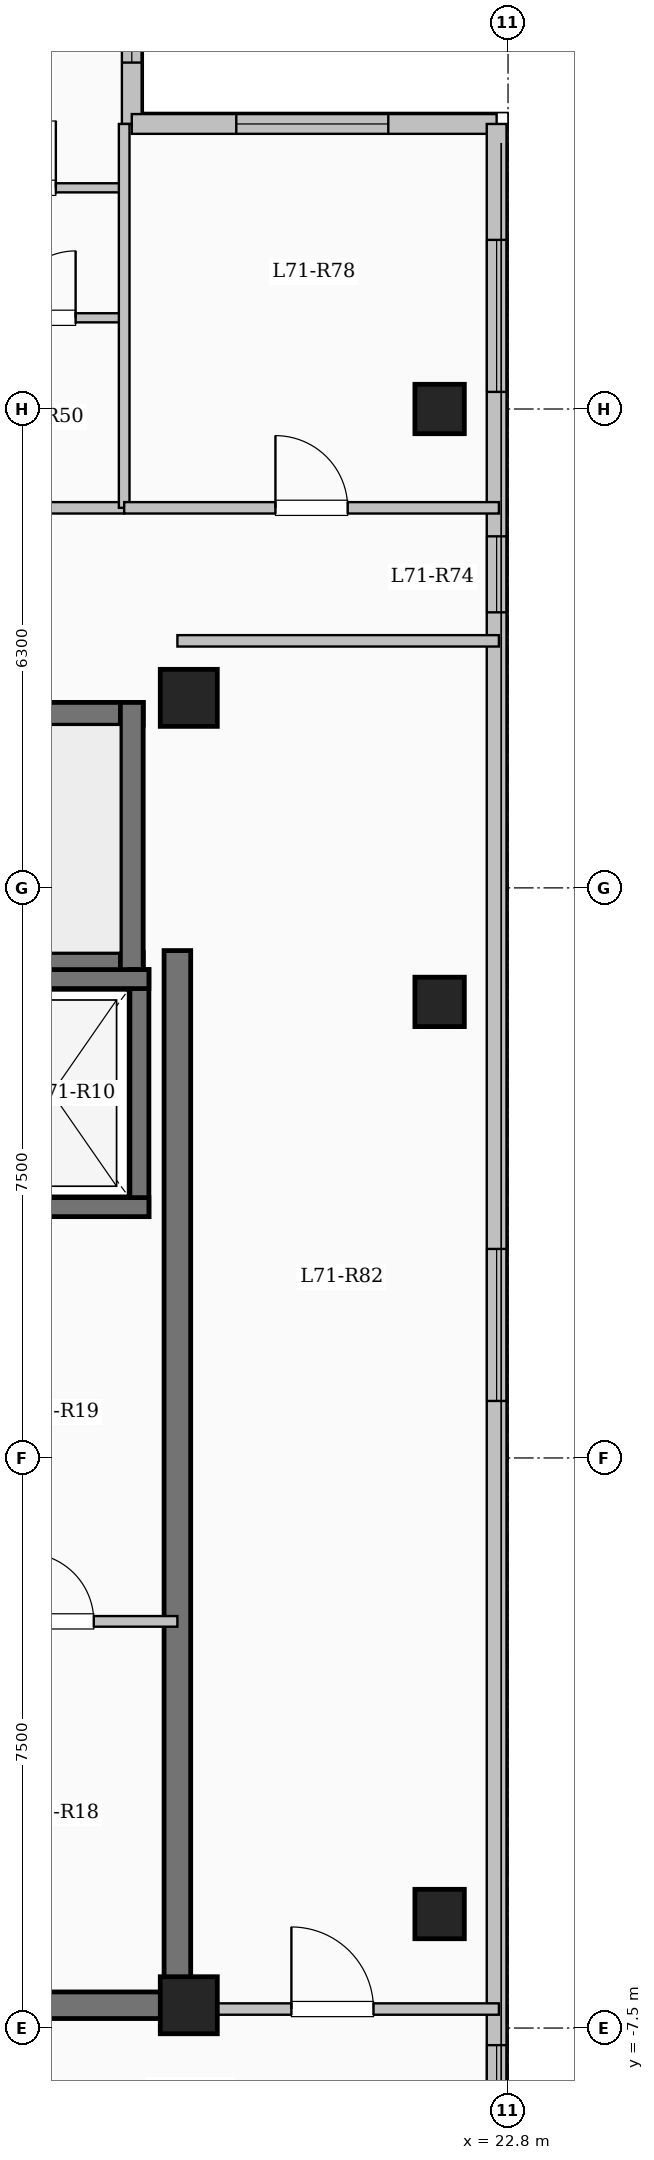
"""IFC4 building model, lengths in metres.
Left out: names, types, materials, properties, quantities, classifications, styles, units other than length and angle.
Written with IfcOpenShell. Run it as: python <this file> out.ifc"""

import sys

from ifc_helpers import new_model, si_unit, direction, frame, frame_2d, origin, origin_2d, place, context, subcontext, project, spatial, rectangle, extrude, element, fill, save


model = new_model("IFC4")
c1 = context("Model", 3, precision=1e-05, world=origin(), true_north=direction((0.0, 1.0)))
c2 = subcontext(c1, "Body", "Model", "MODEL_VIEW")
j1 = project(units=[si_unit("LENGTHUNIT", "METRE"), si_unit("PLANEANGLEUNIT", "RADIAN")], contexts=[c1])
p1 = place(None, origin())
s1 = spatial("IfcSite", under=j1, at=p1, CompositionType="ELEMENT")
p2 = place(p1, origin())
s2 = spatial("IfcBuilding", under=s1, at=p2, CompositionType="ELEMENT")
p3 = place(p2, frame((0.0, 0.0, 261.6)))
s3 = spatial("IfcBuildingStorey", under=s2, at=p3, CompositionType="ELEMENT", Elevation=261.6)
for number, where, z_axis, x_axis in (
    (1, (18.6, -7.2, 0.0), (0.0, 0.0, 1.0), (1.0, 0.0, 0.0)),
    (2, (18.6, 10.0, 0.0), (0.0, 0.0, 1.0), (1.0, 0.0, 0.0)),
):
    element("IfcColumn", number, at=place(p3, frame(where, z_axis=z_axis, x_axis=x_axis)), inside=s3, PredefinedType="COLUMN", context=c2, shape_type="SweptSolid", body=[
        extrude(rectangle(XDim=0.75, YDim=0.75, at=origin_2d()), origin(), (0.0, 0.0, 1.0), 3.35),
    ])
for number, where, z_axis, x_axis in (
    (3, (21.9, -6.0, 0.0), (0.0, 0.0, 1.0), (1.0, 0.0, 0.0)),
    (4, (21.9, 6.0, 0.0), (0.0, 0.0, 1.0), (1.0, 0.0, 0.0)),
    (5, (21.9, 13.8, 0.0), (0.0, 0.0, 1.0), (1.0, 0.0, 0.0)),
):
    element("IfcColumn", number, at=place(p3, frame(where, z_axis=z_axis, x_axis=x_axis)), inside=s3, PredefinedType="COLUMN", context=c2, shape_type="SweptSolid", body=[
        extrude(rectangle(XDim=0.65, YDim=0.65, at=origin_2d()), origin(), (0.0, 0.0, 1.0), 3.35),
    ])
p4 = place(p3, frame((17.85, 20.85, 0.0), z_axis=(0.0, 0.0, 1.0), x_axis=(0.0, -1.0, 0.0)))
e6 = element("IfcWall", 6, at=p4, inside=s3, PredefinedType="SOLIDWALL", context=c2, shape_type="SweptSolid", body=[
    extrude(rectangle(XDim=3.3, YDim=0.26, at=frame_2d((1.65, 0.0))), origin(), (0.0, 0.0, 1.0), 3.1),
])
p5 = place(p4, frame((0.843, 0.0, 0.9)))
e7 = element("IfcOpeningElement", 7, at=p5, cuts=e6, PredefinedType="OPENING", context=c2, shape_type="SweptSolid", body=[
    extrude(rectangle(XDim=1.65, YDim=1.6, at=frame_2d((0.825, 0.8))), frame((0.0, 0.14, 0.0), z_axis=(0.0, -1.0, 0.0), x_axis=(1.0, 0.0, 0.0)), (0.0, 0.0, 1.0), 0.28),
])
p6 = place(p3, frame((17.85, 17.55, 0.0), z_axis=(0.0, 0.0, 1.0), x_axis=(1.0, 0.0, 0.0)))
e8 = element("IfcWall", 8, at=p6, inside=s3, PredefinedType="SOLIDWALL", context=c2, shape_type="SweptSolid", body=[
    extrude(rectangle(XDim=4.8, YDim=0.26, at=frame_2d((2.4, 0.0))), origin(), (0.0, 0.0, 1.0), 3.1),
])
p7 = place(p6, frame((1.375, 0.0, 0.9)))
e9 = element("IfcOpeningElement", 9, at=p7, cuts=e8, PredefinedType="OPENING", context=c2, shape_type="SweptSolid", body=[
    extrude(rectangle(XDim=2.0, YDim=1.7, at=frame_2d((1.0, 0.85))), frame((0.0, 0.14, 0.0), z_axis=(0.0, -1.0, 0.0), x_axis=(1.0, 0.0, 0.0)), (0.0, 0.0, 1.0), 0.28),
])
p8 = place(p3, frame((22.65, 17.55, 0.0), z_axis=(0.0, 0.0, 1.0), x_axis=(0.0, -1.0, 0.0)))
e10 = element("IfcWall", 10, at=p8, inside=s3, PredefinedType="SOLIDWALL", context=c2, shape_type="SweptSolid", body=[
    extrude(rectangle(XDim=35.1, YDim=0.26, at=frame_2d((17.55, 0.0))), origin(), (0.0, 0.0, 1.0), 3.1),
])
p9 = place(p8, frame((1.525, 0.0, 0.9)))
e11 = element("IfcOpeningElement", 11, at=p9, cuts=e10, PredefinedType="OPENING", context=c2, shape_type="SweptSolid", body=[
    extrude(rectangle(XDim=2.0, YDim=1.7, at=frame_2d((1.0, 0.85))), frame((0.0, 0.14, 0.0), z_axis=(0.0, -1.0, 0.0), x_axis=(1.0, 0.0, 0.0)), (0.0, 0.0, 1.0), 0.28),
])
p10 = place(p8, frame((5.425, 0.0, 0.95)))
e12 = element("IfcOpeningElement", 12, at=p10, cuts=e10, PredefinedType="OPENING", context=c2, shape_type="SweptSolid", body=[
    extrude(rectangle(XDim=1.0, YDim=1.5, at=frame_2d((0.5, 0.75))), frame((0.0, 0.14, 0.0), z_axis=(0.0, -1.0, 0.0), x_axis=(1.0, 0.0, 0.0)), (0.0, 0.0, 1.0), 0.28),
])
p11 = place(p8, frame((14.8, 0.0, 0.9)))
e13 = element("IfcOpeningElement", 13, at=p11, cuts=e10, PredefinedType="OPENING", context=c2, shape_type="SweptSolid", body=[
    extrude(rectangle(XDim=2.0, YDim=1.7, at=frame_2d((1.0, 0.85))), frame((0.0, 0.14, 0.0), z_axis=(0.0, -1.0, 0.0), x_axis=(1.0, 0.0, 0.0)), (0.0, 0.0, 1.0), 0.28),
])
p12 = place(p8, frame((25.275, 0.0, 0.95)))
e14 = element("IfcOpeningElement", 14, at=p12, cuts=e10, PredefinedType="OPENING", context=c2, shape_type="SweptSolid", body=[
    extrude(rectangle(XDim=1.2, YDim=1.5, at=frame_2d((0.6, 0.75))), frame((0.0, 0.14, 0.0), z_axis=(0.0, -1.0, 0.0), x_axis=(1.0, 0.0, 0.0)), (0.0, 0.0, 1.0), 0.28),
])
p13 = place(p8, frame((29.925, 0.0, 0.9)))
e15 = element("IfcOpeningElement", 15, at=p13, cuts=e10, PredefinedType="OPENING", context=c2, shape_type="SweptSolid", body=[
    extrude(rectangle(XDim=2.2, YDim=1.75, at=frame_2d((1.1, 0.875))), frame((0.0, 0.14, 0.0), z_axis=(0.0, -1.0, 0.0), x_axis=(1.0, 0.0, 0.0)), (0.0, 0.0, 1.0), 0.28),
])
p14 = place(p3, frame((10.0, 9.79, 0.0), z_axis=(0.0, 0.0, 1.0), x_axis=(1.0, 0.0, 0.0)))
e16 = element("IfcWall", 16, at=p14, inside=s3, PredefinedType="SHEAR", context=c2, shape_type="SweptSolid", body=[
    extrude(rectangle(XDim=8.0, YDim=0.3, at=frame_2d((4.0, 0.0))), origin(), (0.0, 0.0, 1.0), 3.35),
])
p15 = place(p3, frame((10.0, 6.5, 0.0), z_axis=(0.0, 0.0, 1.0), x_axis=(1.0, 0.0, 0.0)))
e17 = element("IfcWall", 17, at=p15, inside=s3, PredefinedType="SHEAR", context=c2, shape_type="SweptSolid", body=[
    extrude(rectangle(XDim=8.0, YDim=0.3, at=frame_2d((4.0, 0.0))), origin(), (0.0, 0.0, 1.0), 3.35),
])
p16 = place(p15, frame((0.55, 0.0, 0.0)))
e18 = element("IfcOpeningElement", 18, at=p16, cuts=e17, PredefinedType="OPENING", context=c2, shape_type="SweptSolid", body=[
    extrude(rectangle(XDim=1.0, YDim=2.15, at=frame_2d((0.5, 1.075))), frame((0.0, 0.16, 0.0), z_axis=(0.0, -1.0, 0.0), x_axis=(1.0, 0.0, 0.0)), (0.0, 0.0, 1.0), 0.32),
])
p17 = place(p3, frame((17.85, 6.35, 0.0), z_axis=(0.0, 0.0, 1.0), x_axis=(0.0, 1.0, 0.0)))
e19 = element("IfcWall", 19, at=p17, inside=s3, PredefinedType="SHEAR", context=c2, shape_type="SweptSolid", body=[
    extrude(rectangle(XDim=3.59, YDim=0.3, at=frame_2d((1.795, 0.0))), origin(), (0.0, 0.0, 1.0), 3.35),
])
p18 = place(p3, frame((17.95, 3.175, 0.0), z_axis=(0.0, 0.0, 1.0), x_axis=(0.0, 1.0, 0.0)))
e20 = element("IfcWall", 20, at=p18, inside=s3, PredefinedType="SHEAR", context=c2, shape_type="SweptSolid", body=[
    extrude(rectangle(XDim=3.25, YDim=0.25, at=frame_2d((1.625, 0.0))), origin(), (0.0, 0.0, 1.0), 3.35),
])
for number, where, z_axis, x_axis in (
    (21, (15.525, 3.3, 0.0), (0.0, 0.0, 1.0), (1.0, 0.0, 0.0)),
    (22, (15.525, 6.3, 0.0), (0.0, 0.0, 1.0), (1.0, 0.0, 0.0)),
):
    element("IfcWall", number, at=place(p3, frame(where, z_axis=z_axis, x_axis=x_axis)), inside=s3, PredefinedType="SHEAR", context=c2, shape_type="SweptSolid", body=[
        extrude(rectangle(XDim=2.55, YDim=0.25, at=frame_2d((1.275, 0.0))), origin(), (0.0, 0.0, 1.0), 3.35),
    ])
p19 = place(p3, frame((18.45, -7.375, 0.0), z_axis=(0.0, 0.0, 1.0), x_axis=(0.0, 1.0, 0.0)))
e23 = element("IfcWall", 23, at=p19, inside=s3, PredefinedType="SHEAR", context=c2, shape_type="SweptSolid", body=[
    extrude(rectangle(XDim=14.05, YDim=0.35, at=frame_2d((7.025, 0.0))), origin(), (0.0, 0.0, 1.0), 3.35),
])
p20 = place(p3, frame((12.625, -7.2, 0.0), z_axis=(0.0, 0.0, 1.0), x_axis=(1.0, 0.0, 0.0)))
e24 = element("IfcWall", 24, at=p20, inside=s3, PredefinedType="SHEAR", context=c2, shape_type="SweptSolid", body=[
    extrude(rectangle(XDim=6.0, YDim=0.35, at=frame_2d((3.0, 0.0))), origin(), (0.0, 0.0, 1.0), 3.35),
])
p21 = place(p3, frame((15.4, -2.15, 0.0), z_axis=(0.0, 0.0, 1.0), x_axis=(1.0, 0.0, 0.0)))
e25 = element("IfcWall", 25, at=p21, inside=s3, PredefinedType="PARTITIONING", context=c2, shape_type="SweptSolid", body=[
    extrude(rectangle(XDim=3.05, YDim=0.14, at=frame_2d((1.525, 0.0))), origin(), (0.0, 0.0, 1.0), 3.1),
])
p22 = place(p21, frame((1.05, 0.0, 0.0)))
e26 = element("IfcOpeningElement", 26, at=p22, cuts=e25, PredefinedType="OPENING", context=c2, shape_type="SweptSolid", body=[
    extrude(rectangle(XDim=0.9, YDim=2.08, at=frame_2d((0.45, 1.04))), frame((0.0, 0.08, 0.0), z_axis=(0.0, -1.0, 0.0), x_axis=(1.0, 0.0, 0.0)), (0.0, 0.0, 1.0), 0.16),
])
p23 = place(p3, frame((3.85, 12.5, 0.0), z_axis=(0.0, 0.0, 1.0), x_axis=(1.0, 0.0, 0.0)))
e27 = element("IfcWall", 27, at=p23, inside=s3, PredefinedType="PARTITIONING", context=c2, shape_type="SweptSolid", body=[
    extrude(rectangle(XDim=13.9, YDim=0.15, at=frame_2d((6.95, 0.0))), origin(), (0.0, 0.0, 1.0), 3.1),
])
p24 = place(p23, frame((0.7, 0.0, 0.0)))
e28 = element("IfcOpeningElement", 28, at=p24, cuts=e27, PredefinedType="OPENING", context=c2, shape_type="SweptSolid", body=[
    extrude(rectangle(XDim=0.96, YDim=2.15, at=frame_2d((0.48, 1.075))), frame((0.0, 0.085, 0.0), z_axis=(0.0, -1.0, 0.0), x_axis=(1.0, 0.0, 0.0)), (0.0, 0.0, 1.0), 0.17),
])
p25 = place(p23, frame((6.35, 0.0, 0.0)))
e29 = element("IfcOpeningElement", 29, at=p25, cuts=e27, PredefinedType="OPENING", context=c2, shape_type="SweptSolid", body=[
    extrude(rectangle(XDim=0.96, YDim=2.15, at=frame_2d((0.48, 1.075))), frame((0.0, 0.085, 0.0), z_axis=(0.0, -1.0, 0.0), x_axis=(1.0, 0.0, 0.0)), (0.0, 0.0, 1.0), 0.17),
])
p26 = place(p3, frame((15.592, 15.0, 0.0), z_axis=(0.0, 0.0, 1.0), x_axis=(1.0, 0.0, 0.0)))
e30 = element("IfcWall", 30, at=p26, inside=s3, PredefinedType="PARTITIONING", context=c2, shape_type="SweptSolid", body=[
    extrude(rectangle(XDim=2.158, YDim=0.12, at=frame_2d((1.079, 0.0))), origin(), (0.0, 0.0, 1.0), 3.1),
])
p27 = place(p26, frame((0.639, 0.0, 0.0)))
e31 = element("IfcOpeningElement", 31, at=p27, cuts=e30, PredefinedType="OPENING", context=c2, shape_type="SweptSolid", body=[
    extrude(rectangle(XDim=0.88, YDim=2.1, at=frame_2d((0.44, 1.05))), frame((0.0, 0.07, 0.0), z_axis=(0.0, -1.0, 0.0), x_axis=(1.0, 0.0, 0.0)), (0.0, 0.0, 1.0), 0.14),
])
p28 = place(p3, frame((12.752, 16.71, 0.0), z_axis=(0.0, 0.0, 1.0), x_axis=(1.0, 0.0, 0.0)))
e32 = element("IfcWall", 32, at=p28, inside=s3, PredefinedType="PARTITIONING", context=c2, shape_type="SweptSolid", body=[
    extrude(rectangle(XDim=5.058, YDim=0.12, at=frame_2d((2.529, 0.0))), origin(), (0.0, 0.0, 1.0), 2.785),
])
p29 = place(p28, frame((0.78, 0.0, 0.0)))
e33 = element("IfcOpeningElement", 33, at=p29, cuts=e32, PredefinedType="OPENING", context=c2, shape_type="SweptSolid", body=[
    extrude(rectangle(XDim=0.88, YDim=2.1, at=frame_2d((0.44, 1.05))), frame((0.0, 0.07, 0.0), z_axis=(0.0, -1.0, 0.0), x_axis=(1.0, 0.0, 0.0)), (0.0, 0.0, 1.0), 0.14),
])
p30 = place(p28, frame((3.219, 0.0, 0.0)))
e34 = element("IfcOpeningElement", 34, at=p30, cuts=e32, PredefinedType="OPENING", context=c2, shape_type="SweptSolid", body=[
    extrude(rectangle(XDim=0.88, YDim=2.1, at=frame_2d((0.44, 1.05))), frame((0.0, 0.07, 0.0), z_axis=(0.0, -1.0, 0.0), x_axis=(1.0, 0.0, 0.0)), (0.0, 0.0, 1.0), 0.14),
])
p31 = place(p3, frame((18.45, -7.25, 0.0), z_axis=(0.0, 0.0, 1.0), x_axis=(1.0, 0.0, 0.0)))
e35 = element("IfcWall", 35, at=p31, inside=s3, PredefinedType="PARTITIONING", context=c2, shape_type="SweptSolid", body=[
    extrude(rectangle(XDim=4.23, YDim=0.15, at=frame_2d((2.115, 0.0))), origin(), (0.0, 0.0, 1.0), 3.1),
])
p32 = place(p31, frame((1.5, 0.0, 0.0)))
e36 = element("IfcOpeningElement", 36, at=p32, cuts=e35, PredefinedType="OPENING", context=c2, shape_type="SweptSolid", body=[
    extrude(rectangle(XDim=1.08, YDim=2.15, at=frame_2d((0.54, 1.075))), frame((0.0, 0.085, 0.0), z_axis=(0.0, -1.0, 0.0), x_axis=(1.0, 0.0, 0.0)), (0.0, 0.0, 1.0), 0.17),
])
p33 = place(p3, frame((18.45, 10.75, 0.0), z_axis=(0.0, 0.0, 1.0), x_axis=(1.0, 0.0, 0.0)))
e37 = element("IfcWall", 37, at=p33, inside=s3, PredefinedType="PARTITIONING", context=c2, shape_type="SweptSolid", body=[
    extrude(rectangle(XDim=4.23, YDim=0.15, at=frame_2d((2.115, 0.0))), origin(), (0.0, 0.0, 1.0), 3.1),
])
p34 = place(p3, frame((17.75, 12.5, 0.0), z_axis=(0.0, 0.0, 1.0), x_axis=(0.0, 1.0, 0.0)))
e38 = element("IfcWall", 38, at=p34, inside=s3, PredefinedType="PARTITIONING", context=c2, shape_type="SweptSolid", body=[
    extrude(rectangle(XDim=5.05, YDim=0.14, at=frame_2d((2.525, 0.0))), origin(), (0.0, 0.0, 1.0), 3.1),
])
p35 = place(p3, frame((17.75, 12.5, 0.0), z_axis=(0.0, 0.0, 1.0), x_axis=(1.0, 0.0, 0.0)))
e39 = element("IfcWall", 39, at=p35, inside=s3, PredefinedType="PARTITIONING", context=c2, shape_type="SweptSolid", body=[
    extrude(rectangle(XDim=4.93, YDim=0.15, at=frame_2d((2.465, 0.0))), origin(), (0.0, 0.0, 1.0), 3.1),
])
p36 = place(p35, frame((1.99, 0.0, 0.0)))
e40 = element("IfcOpeningElement", 40, at=p36, cuts=e39, PredefinedType="OPENING", context=c2, shape_type="SweptSolid", body=[
    extrude(rectangle(XDim=0.95, YDim=2.15, at=frame_2d((0.475, 1.075))), frame((0.0, 0.085, 0.0), z_axis=(0.0, -1.0, 0.0), x_axis=(1.0, 0.0, 0.0)), (0.0, 0.0, 1.0), 0.17),
])
p37 = place(p5, origin())
e41 = element("IfcWindow", 41, at=p37, inside=s3, PartitioningType="SINGLE_PANEL", PredefinedType="WINDOW", context=c2, shape_type="SweptSolid", body=[
    extrude(rectangle(XDim=1.65, YDim=1.6, at=frame_2d((0.825, 0.8))), frame((0.0, 0.03, 0.0), z_axis=(0.0, -1.0, 0.0), x_axis=(1.0, 0.0, 0.0)), (0.0, 0.0, 1.0), 0.06),
])
fill(e7, e41)
p38 = place(p7, origin())
e42 = element("IfcWindow", 42, at=p38, inside=s3, PartitioningType="SINGLE_PANEL", PredefinedType="WINDOW", context=c2, shape_type="SweptSolid", body=[
    extrude(rectangle(XDim=2.0, YDim=1.7, at=frame_2d((1.0, 0.85))), frame((0.0, 0.03, 0.0), z_axis=(0.0, -1.0, 0.0), x_axis=(1.0, 0.0, 0.0)), (0.0, 0.0, 1.0), 0.06),
])
fill(e9, e42)
p39 = place(p9, origin())
e43 = element("IfcWindow", 43, at=p39, inside=s3, PartitioningType="SINGLE_PANEL", PredefinedType="WINDOW", context=c2, shape_type="SweptSolid", body=[
    extrude(rectangle(XDim=2.0, YDim=1.7, at=frame_2d((1.0, 0.85))), frame((0.0, 0.03, 0.0), z_axis=(0.0, -1.0, 0.0), x_axis=(1.0, 0.0, 0.0)), (0.0, 0.0, 1.0), 0.06),
])
fill(e11, e43)
p40 = place(p10, origin())
e44 = element("IfcWindow", 44, at=p40, inside=s3, PartitioningType="SINGLE_PANEL", PredefinedType="WINDOW", context=c2, shape_type="SweptSolid", body=[
    extrude(rectangle(XDim=1.0, YDim=1.5, at=frame_2d((0.5, 0.75))), frame((0.0, 0.03, 0.0), z_axis=(0.0, -1.0, 0.0), x_axis=(1.0, 0.0, 0.0)), (0.0, 0.0, 1.0), 0.06),
])
fill(e12, e44)
p41 = place(p11, origin())
e45 = element("IfcWindow", 45, at=p41, inside=s3, PartitioningType="SINGLE_PANEL", PredefinedType="WINDOW", context=c2, shape_type="SweptSolid", body=[
    extrude(rectangle(XDim=2.0, YDim=1.7, at=frame_2d((1.0, 0.85))), frame((0.0, 0.03, 0.0), z_axis=(0.0, -1.0, 0.0), x_axis=(1.0, 0.0, 0.0)), (0.0, 0.0, 1.0), 0.06),
])
fill(e13, e45)
p42 = place(p12, origin())
e46 = element("IfcWindow", 46, at=p42, inside=s3, PartitioningType="SINGLE_PANEL", PredefinedType="WINDOW", context=c2, shape_type="SweptSolid", body=[
    extrude(rectangle(XDim=1.2, YDim=1.5, at=frame_2d((0.6, 0.75))), frame((0.0, 0.03, 0.0), z_axis=(0.0, -1.0, 0.0), x_axis=(1.0, 0.0, 0.0)), (0.0, 0.0, 1.0), 0.06),
])
fill(e14, e46)
p43 = place(p22, origin())
e47 = element("IfcDoor", 47, at=p43, inside=s3, OperationType="SINGLE_SWING_LEFT", PredefinedType="DOOR", context=c2, shape_type="SweptSolid", body=[
    extrude(rectangle(XDim=0.9, YDim=2.08, at=frame_2d((0.45, 1.04))), frame((0.0, 0.025, 0.0), z_axis=(0.0, -1.0, 0.0), x_axis=(1.0, 0.0, 0.0)), (0.0, 0.0, 1.0), 0.05),
])
fill(e26, e47)
p44 = place(p27, origin())
e48 = element("IfcDoor", 48, at=p44, inside=s3, OperationType="SINGLE_SWING_RIGHT", PredefinedType="DOOR", context=c2, shape_type="SweptSolid", body=[
    extrude(rectangle(XDim=0.88, YDim=2.1, at=frame_2d((0.44, 1.05))), frame((0.0, 0.025, 0.0), z_axis=(0.0, -1.0, 0.0), x_axis=(1.0, 0.0, 0.0)), (0.0, 0.0, 1.0), 0.05),
])
fill(e31, e48)
p45 = place(p30, origin())
e49 = element("IfcDoor", 49, at=p45, inside=s3, OperationType="SINGLE_SWING_RIGHT", PredefinedType="DOOR", context=c2, shape_type="SweptSolid", body=[
    extrude(rectangle(XDim=0.88, YDim=2.1, at=frame_2d((0.44, 1.05))), frame((0.0, 0.025, 0.0), z_axis=(0.0, -1.0, 0.0), x_axis=(1.0, 0.0, 0.0)), (0.0, 0.0, 1.0), 0.05),
])
fill(e34, e49)
p46 = place(p36, origin())
e50 = element("IfcDoor", 50, at=p46, inside=s3, OperationType="SINGLE_SWING_LEFT", PredefinedType="DOOR", context=c2, shape_type="SweptSolid", body=[
    extrude(rectangle(XDim=0.95, YDim=2.15, at=frame_2d((0.475, 1.075))), frame((0.0, 0.025, 0.0), z_axis=(0.0, -1.0, 0.0), x_axis=(1.0, 0.0, 0.0)), (0.0, 0.0, 1.0), 0.05),
])
fill(e40, e50)
p47 = place(p32, origin())
e51 = element("IfcDoor", 51, at=p47, inside=s3, OperationType="SINGLE_SWING_LEFT", PredefinedType="DOOR", context=c2, shape_type="SweptSolid", body=[
    extrude(rectangle(XDim=1.08, YDim=2.15, at=frame_2d((0.54, 1.075))), frame((0.0, 0.025, 0.0), z_axis=(0.0, -1.0, 0.0), x_axis=(1.0, 0.0, 0.0)), (0.0, 0.0, 1.0), 0.05),
])
fill(e36, e51)
save(model, sys.argv[1])
